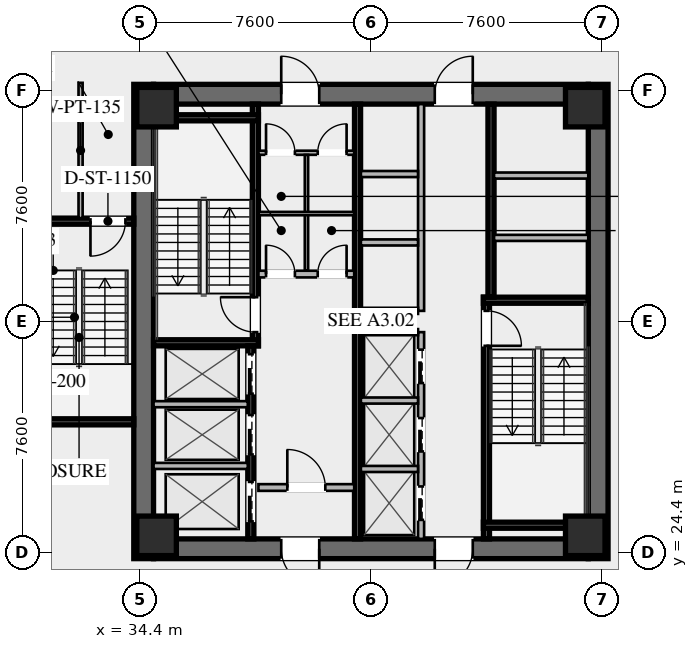
"""IFC4 building model, lengths in metres.
Left out: names, types, materials, properties, quantities, classifications, styles, units other than length and angle.
Written with IfcOpenShell. Run it as: python <this file> out.ifc"""

import sys

from ifc_helpers import new_model, si_unit, direction, frame, frame_2d, origin, origin_2d, place, context, subcontext, project, spatial, rectangle, hollow_rectangle, extrude, element, fill, save


model = new_model("IFC4")
c1 = context("Model", 3, precision=1e-05, world=origin(), true_north=direction((0.0, 1.0)))
c2 = subcontext(c1, "Body", "Model", "MODEL_VIEW")
j1 = project(units=[si_unit("LENGTHUNIT", "METRE"), si_unit("PLANEANGLEUNIT", "RADIAN")], contexts=[c1])
p1 = place(None, origin())
s1 = spatial("IfcSite", under=j1, at=p1, CompositionType="ELEMENT")
p2 = place(p1, origin())
s2 = spatial("IfcBuilding", under=s1, at=p2, CompositionType="ELEMENT")
p3 = place(p2, frame((0.0, 0.0, 15.6)))
s3 = spatial("IfcBuildingStorey", under=s2, at=p3, CompositionType="ELEMENT", Elevation=15.6)
for number, where, z_axis, x_axis in (
    (1, (34.525, 24.2, 0.0), (0.0, 0.0, 1.0), (0.0, 1.0, 0.0)),
    (2, (49.475, 39.8, 0.0), (0.0, 0.0, 1.0), (0.0, -1.0, 0.0)),
):
    element("IfcWall", number, at=place(p3, frame(where, z_axis=z_axis, x_axis=x_axis)), inside=s3, PredefinedType="SHEAR", context=c2, shape_type="SweptSolid", body=[
        extrude(rectangle(XDim=15.6, YDim=0.65, at=frame_2d((7.8, 0.0))), origin(), (0.0, 0.0, 1.0), 4.2),
    ])
p4 = place(p3, frame((49.15, 24.525, 0.0), z_axis=(0.0, 0.0, 1.0), x_axis=(-1.0, 0.0, 0.0)))
e3 = element("IfcWall", 3, at=p4, inside=s3, PredefinedType="SHEAR", context=c2, shape_type="SweptSolid", body=[
    extrude(rectangle(XDim=14.3, YDim=0.65, at=frame_2d((7.15, 0.0))), origin(), (0.0, 0.0, 1.0), 4.2),
])
p5 = place(p4, frame((8.85, 0.0, 0.0)))
e4 = element("IfcOpeningElement", 4, at=p5, cuts=e3, PredefinedType="OPENING", context=c2, shape_type="SweptSolid", body=[
    extrude(rectangle(XDim=1.25, YDim=2.25, at=frame_2d((0.625, 1.125))), frame((0.0, 0.335, 0.0), z_axis=(0.0, -1.0, 0.0), x_axis=(1.0, 0.0, 0.0)), (0.0, 0.0, 1.0), 0.67),
])
p6 = place(p4, frame((3.8, 0.0, 0.0)))
e5 = element("IfcOpeningElement", 5, at=p6, cuts=e3, PredefinedType="OPENING", context=c2, shape_type="SweptSolid", body=[
    extrude(rectangle(XDim=1.25, YDim=2.25, at=frame_2d((0.625, 1.125))), frame((0.0, 0.335, 0.0), z_axis=(0.0, -1.0, 0.0), x_axis=(1.0, 0.0, 0.0)), (0.0, 0.0, 1.0), 0.67),
])
p7 = place(p3, frame((34.85, 39.475, 0.0), z_axis=(0.0, 0.0, 1.0), x_axis=(1.0, 0.0, 0.0)))
e6 = element("IfcWall", 6, at=p7, inside=s3, PredefinedType="SHEAR", context=c2, shape_type="SweptSolid", body=[
    extrude(rectangle(XDim=14.3, YDim=0.65, at=frame_2d((7.15, 0.0))), origin(), (0.0, 0.0, 1.0), 4.2),
])
p8 = place(p7, frame((4.2, 0.0, 0.0)))
e7 = element("IfcOpeningElement", 7, at=p8, cuts=e6, PredefinedType="OPENING", context=c2, shape_type="SweptSolid", body=[
    extrude(rectangle(XDim=1.25, YDim=2.25, at=frame_2d((0.625, 1.125))), frame((0.0, 0.335, 0.0), z_axis=(0.0, -1.0, 0.0), x_axis=(1.0, 0.0, 0.0)), (0.0, 0.0, 1.0), 0.67),
])
p9 = place(p7, frame((9.25, 0.0, 0.0)))
e8 = element("IfcOpeningElement", 8, at=p9, cuts=e6, PredefinedType="OPENING", context=c2, shape_type="SweptSolid", body=[
    extrude(rectangle(XDim=1.25, YDim=2.25, at=frame_2d((0.625, 1.125))), frame((0.0, 0.335, 0.0), z_axis=(0.0, -1.0, 0.0), x_axis=(1.0, 0.0, 0.0)), (0.0, 0.0, 1.0), 0.67),
])
for number, where, z_axis, x_axis in (
    (9, (34.95, 24.95, 0.0), (0.0, 0.0, 1.0), (1.0, 0.0, 0.0)),
    (10, (49.05, 24.95, 0.0), (0.0, 0.0, 1.0), (1.0, 0.0, 0.0)),
    (11, (49.05, 39.05, 0.0), (0.0, 0.0, 1.0), (1.0, 0.0, 0.0)),
    (12, (34.95, 39.05, 0.0), (0.0, 0.0, 1.0), (1.0, 0.0, 0.0)),
):
    element("IfcColumn", number, at=place(p3, frame(where, z_axis=z_axis, x_axis=x_axis)), inside=s3, PredefinedType="COLUMN", context=c2, shape_type="SweptSolid", body=[
        extrude(hollow_rectangle(XDim=1.3, YDim=1.3, WallThickness=0.05, at=origin_2d()), origin(), (0.0, 0.0, 1.0), 3.9),
    ])
p10 = place(p3, frame((38.2, 31.2, 0.0), z_axis=(0.0, 0.0, 1.0), x_axis=(0.0, 1.0, 0.0)))
e13 = element("IfcWall", 13, at=p10, inside=s3, PredefinedType="SHEAR", context=c2, shape_type="SweptSolid", body=[
    extrude(rectangle(XDim=7.95, YDim=0.2, at=frame_2d((3.975, 0.0))), origin(), (0.0, 0.0, 1.0), 3.9),
])
p11 = place(p10, frame((0.45, 0.0, 0.0)))
e14 = element("IfcOpeningElement", 14, at=p11, cuts=e13, PredefinedType="OPENING", context=c2, shape_type="SweptSolid", body=[
    extrude(rectangle(XDim=1.15, YDim=2.2, at=frame_2d((0.575, 1.1))), frame((0.0, 0.11, 0.0), z_axis=(0.0, -1.0, 0.0), x_axis=(1.0, 0.0, 0.0)), (0.0, 0.0, 1.0), 0.22),
])
for number, where, z_axis, x_axis in (
    (15, (34.85, 31.3, 0.0), (0.0, 0.0, 1.0), (1.0, 0.0, 0.0)),
    (16, (34.85, 38.7, 0.0), (0.0, 0.0, 1.0), (1.0, 0.0, 0.0)),
):
    element("IfcWall", number, at=place(p3, frame(where, z_axis=z_axis, x_axis=x_axis)), inside=s3, PredefinedType="SHEAR", context=c2, shape_type="SweptSolid", body=[
        extrude(rectangle(XDim=3.45, YDim=0.2, at=frame_2d((1.725, 0.0))), origin(), (0.0, 0.0, 1.0), 3.9),
    ])
p12 = place(p3, frame((45.8, 32.8, 0.0), z_axis=(0.0, 0.0, 1.0), x_axis=(0.0, -1.0, 0.0)))
e17 = element("IfcWall", 17, at=p12, inside=s3, PredefinedType="SHEAR", context=c2, shape_type="SweptSolid", body=[
    extrude(rectangle(XDim=7.95, YDim=0.2, at=frame_2d((3.975, 0.0))), origin(), (0.0, 0.0, 1.0), 3.9),
])
p13 = place(p12, frame((0.45, 0.0, 0.0)))
e18 = element("IfcOpeningElement", 18, at=p13, cuts=e17, PredefinedType="OPENING", context=c2, shape_type="SweptSolid", body=[
    extrude(rectangle(XDim=1.15, YDim=2.2, at=frame_2d((0.575, 1.1))), frame((0.0, 0.11, 0.0), z_axis=(0.0, -1.0, 0.0), x_axis=(1.0, 0.0, 0.0)), (0.0, 0.0, 1.0), 0.22),
])
for number, where, z_axis, x_axis in (
    (19, (45.7, 32.7, 0.0), (0.0, 0.0, 1.0), (1.0, 0.0, 0.0)),
    (20, (45.7, 25.3, 0.0), (0.0, 0.0, 1.0), (1.0, 0.0, 0.0)),
):
    element("IfcWall", number, at=place(p3, frame(where, z_axis=z_axis, x_axis=x_axis)), inside=s3, PredefinedType="SHEAR", context=c2, shape_type="SweptSolid", body=[
        extrude(rectangle(XDim=3.45, YDim=0.2, at=frame_2d((1.725, 0.0))), origin(), (0.0, 0.0, 1.0), 3.9),
    ])
p14 = place(p3, frame((41.56, 24.85, 0.0), z_axis=(0.0, 0.0, 1.0), x_axis=(0.0, 1.0, 0.0)))
e21 = element("IfcWall", 21, at=p14, inside=s3, PredefinedType="SHEAR", context=c2, shape_type="SweptSolid", body=[
    extrude(rectangle(XDim=14.3, YDim=0.2, at=frame_2d((7.15, 0.0))), origin(), (0.0, 0.0, 1.0), 3.9),
])
p15 = place(p3, frame((38.3, 33.56, 0.0), z_axis=(0.0, 0.0, 1.0), x_axis=(1.0, 0.0, 0.0)))
e22 = element("IfcWall", 22, at=p15, inside=s3, PredefinedType="SOLIDWALL", context=c2, shape_type="SweptSolid", body=[
    extrude(rectangle(XDim=3.15, YDim=0.22, at=frame_2d((1.575, 0.0))), origin(), (0.0, 0.0, 1.0), 2.943),
])
p16 = place(p15, frame((0.25, 0.0, 0.0)))
e23 = element("IfcOpeningElement", 23, at=p16, cuts=e22, PredefinedType="OPENING", context=c2, shape_type="SweptSolid", body=[
    extrude(rectangle(XDim=0.95, YDim=2.05, at=frame_2d((0.475, 1.025))), frame((0.0, 0.12, 0.0), z_axis=(0.0, -1.0, 0.0), x_axis=(1.0, 0.0, 0.0)), (0.0, 0.0, 1.0), 0.24),
])
p17 = place(p15, frame((1.95, 0.0, 0.0)))
e24 = element("IfcOpeningElement", 24, at=p17, cuts=e22, PredefinedType="OPENING", context=c2, shape_type="SweptSolid", body=[
    extrude(rectangle(XDim=0.95, YDim=2.05, at=frame_2d((0.475, 1.025))), frame((0.0, 0.12, 0.0), z_axis=(0.0, -1.0, 0.0), x_axis=(1.0, 0.0, 0.0)), (0.0, 0.0, 1.0), 0.24),
])
p18 = place(p3, frame((38.3, 26.54, 0.0), z_axis=(0.0, 0.0, 1.0), x_axis=(1.0, 0.0, 0.0)))
e25 = element("IfcWall", 25, at=p18, inside=s3, PredefinedType="SOLIDWALL", context=c2, shape_type="SweptSolid", body=[
    extrude(rectangle(XDim=3.15, YDim=0.22, at=frame_2d((1.575, 0.0))), origin(), (0.0, 0.0, 1.0), 2.943),
])
p19 = place(p18, frame((0.95, 0.0, 0.0)))
e26 = element("IfcOpeningElement", 26, at=p19, cuts=e25, PredefinedType="OPENING", context=c2, shape_type="SweptSolid", body=[
    extrude(rectangle(XDim=1.25, YDim=2.25, at=frame_2d((0.625, 1.125))), frame((0.0, 0.12, 0.0), z_axis=(0.0, -1.0, 0.0), x_axis=(1.0, 0.0, 0.0)), (0.0, 0.0, 1.0), 0.24),
])
p20 = place(p3, frame((38.05, 24.85, 0.0), z_axis=(0.0, 0.0, 1.0), x_axis=(0.0, 1.0, 0.0)))
e27 = element("IfcWall", 27, at=p20, inside=s3, PredefinedType="SHEAR", context=c2, shape_type="SweptSolid", body=[
    extrude(rectangle(XDim=6.35, YDim=0.2, at=frame_2d((3.175, 0.0))), origin(), (0.0, 0.0, 1.0), 3.9),
])
p21 = place(p20, frame((4.775, 0.0, 0.0)))
e28 = element("IfcOpeningElement", 28, at=p21, cuts=e27, PredefinedType="OPENING", context=c2, shape_type="SweptSolid", body=[
    extrude(rectangle(XDim=1.3, YDim=2.25, at=frame_2d((0.65, 1.125))), frame((0.0, 0.11, 0.0), z_axis=(0.0, -1.0, 0.0), x_axis=(1.0, 0.0, 0.0)), (0.0, 0.0, 1.0), 0.22),
])
p22 = place(p20, frame((2.775, 0.0, 0.0)))
e29 = element("IfcOpeningElement", 29, at=p22, cuts=e27, PredefinedType="OPENING", context=c2, shape_type="SweptSolid", body=[
    extrude(rectangle(XDim=1.3, YDim=2.25, at=frame_2d((0.65, 1.125))), frame((0.0, 0.11, 0.0), z_axis=(0.0, -1.0, 0.0), x_axis=(1.0, 0.0, 0.0)), (0.0, 0.0, 1.0), 0.22),
])
p23 = place(p20, frame((0.575, 0.0, 0.0)))
e30 = element("IfcOpeningElement", 30, at=p23, cuts=e27, PredefinedType="OPENING", context=c2, shape_type="SweptSolid", body=[
    extrude(rectangle(XDim=1.3, YDim=2.25, at=frame_2d((0.65, 1.125))), frame((0.0, 0.11, 0.0), z_axis=(0.0, -1.0, 0.0), x_axis=(1.0, 0.0, 0.0)), (0.0, 0.0, 1.0), 0.22),
])
for number, where, z_axis, x_axis in (
    (31, (34.85, 27.25, 0.0), (0.0, 0.0, 1.0), (1.0, 0.0, 0.0)),
    (32, (34.85, 29.28, 0.0), (0.0, 0.0, 1.0), (1.0, 0.0, 0.0)),
):
    element("IfcWall", number, at=place(p3, frame(where, z_axis=z_axis, x_axis=x_axis)), inside=s3, PredefinedType="SOLIDWALL", context=c2, shape_type="SweptSolid", body=[
        extrude(rectangle(XDim=3.1, YDim=0.2, at=frame_2d((1.55, 0.0))), origin(), (0.0, 0.0, 1.0), 3.9),
    ])
p24 = place(p3, frame((45.95, 39.15, 0.0), z_axis=(0.0, 0.0, 1.0), x_axis=(0.0, -1.0, 0.0)))
e33 = element("IfcWall", 33, at=p24, inside=s3, PredefinedType="SHEAR", context=c2, shape_type="SweptSolid", body=[
    extrude(rectangle(XDim=6.35, YDim=0.2, at=frame_2d((3.175, 0.0))), origin(), (0.0, 0.0, 1.0), 3.9),
])
for number, where, z_axis, x_axis in (
    (34, (46.05, 34.75, 0.0), (0.0, 0.0, 1.0), (1.0, 0.0, 0.0)),
    (35, (46.05, 36.8, 0.0), (0.0, 0.0, 1.0), (1.0, 0.0, 0.0)),
):
    element("IfcWall", number, at=place(p3, frame(where, z_axis=z_axis, x_axis=x_axis)), inside=s3, PredefinedType="SOLIDWALL", context=c2, shape_type="SweptSolid", body=[
        extrude(rectangle(XDim=3.1, YDim=0.2, at=frame_2d((1.55, 0.0))), origin(), (0.0, 0.0, 1.0), 3.9),
    ])
p25 = place(p3, frame((38.3, 37.55, 0.0), z_axis=(0.0, 0.0, 1.0), x_axis=(1.0, 0.0, 0.0)))
e36 = element("IfcWall", 36, at=p25, inside=s3, PredefinedType="PARTITIONING", context=c2, shape_type="SweptSolid", body=[
    extrude(rectangle(XDim=3.15, YDim=0.135, at=frame_2d((1.575, 0.0))), origin(), (0.0, 0.0, 1.0), 2.943),
])
p26 = place(p25, frame((0.25, 0.0, 0.0)))
e37 = element("IfcOpeningElement", 37, at=p26, cuts=e36, PredefinedType="OPENING", context=c2, shape_type="SweptSolid", body=[
    extrude(rectangle(XDim=0.95, YDim=2.05, at=frame_2d((0.475, 1.025))), frame((0.0, 0.077, 0.0), z_axis=(0.0, -1.0, 0.0), x_axis=(1.0, 0.0, 0.0)), (0.0, 0.0, 1.0), 0.155),
])
p27 = place(p25, frame((1.95, 0.0, 0.0)))
e38 = element("IfcOpeningElement", 38, at=p27, cuts=e36, PredefinedType="OPENING", context=c2, shape_type="SweptSolid", body=[
    extrude(rectangle(XDim=0.95, YDim=2.05, at=frame_2d((0.475, 1.025))), frame((0.0, 0.077, 0.0), z_axis=(0.0, -1.0, 0.0), x_axis=(1.0, 0.0, 0.0)), (0.0, 0.0, 1.0), 0.155),
])
p28 = place(p3, frame((39.88, 33.68, 0.0), z_axis=(0.0, 0.0, 1.0), x_axis=(0.0, 1.0, 0.0)))
e39 = element("IfcWall", 39, at=p28, inside=s3, PredefinedType="PARTITIONING", context=c2, shape_type="SweptSolid", body=[
    extrude(rectangle(XDim=3.8, YDim=0.11, at=frame_2d((1.9, 0.0))), origin(), (0.0, 0.0, 1.0), 2.943),
])
p29 = place(p3, frame((38.3, 35.55, 0.0), z_axis=(0.0, 0.0, 1.0), x_axis=(1.0, 0.0, 0.0)))
e40 = element("IfcWall", 40, at=p29, inside=s3, PredefinedType="PARTITIONING", context=c2, shape_type="SweptSolid", body=[
    extrude(rectangle(XDim=3.15, YDim=0.11, at=frame_2d((1.575, 0.0))), origin(), (0.0, 0.0, 1.0), 2.943),
])
p30 = place(p3, frame((43.65, 24.85, 0.0), z_axis=(0.0, 0.0, 1.0), x_axis=(0.0, 1.0, 0.0)))
e41 = element("IfcWall", 41, at=p30, inside=s3, PredefinedType="SOLIDWALL", context=c2, shape_type="SweptSolid", body=[
    extrude(rectangle(XDim=6.8, YDim=0.2, at=frame_2d((3.4, 0.0))), origin(), (0.0, 0.0, 1.0), 3.9),
])
p31 = place(p30, frame((0.625, 0.0, 0.0)))
e42 = element("IfcOpeningElement", 42, at=p31, cuts=e41, PredefinedType="OPENING", context=c2, shape_type="SweptSolid", body=[
    extrude(rectangle(XDim=1.1, YDim=2.2, at=frame_2d((0.55, 1.1))), frame((0.0, 0.11, 0.0), z_axis=(0.0, -1.0, 0.0), x_axis=(1.0, 0.0, 0.0)), (0.0, 0.0, 1.0), 0.22),
])
p32 = place(p30, frame((2.875, 0.0, 0.0)))
e43 = element("IfcOpeningElement", 43, at=p32, cuts=e41, PredefinedType="OPENING", context=c2, shape_type="SweptSolid", body=[
    extrude(rectangle(XDim=1.1, YDim=2.2, at=frame_2d((0.55, 1.1))), frame((0.0, 0.11, 0.0), z_axis=(0.0, -1.0, 0.0), x_axis=(1.0, 0.0, 0.0)), (0.0, 0.0, 1.0), 0.22),
])
p33 = place(p30, frame((5.125, 0.0, 0.0)))
e44 = element("IfcOpeningElement", 44, at=p33, cuts=e41, PredefinedType="OPENING", context=c2, shape_type="SweptSolid", body=[
    extrude(rectangle(XDim=1.1, YDim=2.2, at=frame_2d((0.55, 1.1))), frame((0.0, 0.11, 0.0), z_axis=(0.0, -1.0, 0.0), x_axis=(1.0, 0.0, 0.0)), (0.0, 0.0, 1.0), 0.22),
])
for number, where, z_axis, x_axis in (
    (45, (41.67, 27.15, 0.0), (0.0, 0.0, 1.0), (1.0, 0.0, 0.0)),
    (46, (41.67, 29.4, 0.0), (0.0, 0.0, 1.0), (1.0, 0.0, 0.0)),
    (47, (41.67, 31.65, 0.0), (0.0, 0.0, 1.0), (1.0, 0.0, 0.0)),
):
    element("IfcWall", number, at=place(p3, frame(where, z_axis=z_axis, x_axis=x_axis)), inside=s3, PredefinedType="SOLIDWALL", context=c2, shape_type="SweptSolid", body=[
        extrude(rectangle(XDim=1.88, YDim=0.2, at=frame_2d((0.94, 0.0))), origin(), (0.0, 0.0, 1.0), 3.9),
    ])
p34 = place(p3, frame((43.65, 32.35, 0.0), z_axis=(0.0, 0.0, 1.0), x_axis=(0.0, 1.0, 0.0)))
e48 = element("IfcWall", 48, at=p34, inside=s3, PredefinedType="SOLIDWALL", context=c2, shape_type="SweptSolid", body=[
    extrude(rectangle(XDim=6.8, YDim=0.2, at=frame_2d((3.4, 0.0))), origin(), (0.0, 0.0, 1.0), 3.9),
])
for number, where, z_axis, x_axis in (
    (49, (41.67, 32.35, 0.0), (0.0, 0.0, 1.0), (1.0, 0.0, 0.0)),
    (50, (41.67, 34.6, 0.0), (0.0, 0.0, 1.0), (1.0, 0.0, 0.0)),
    (51, (41.67, 36.85, 0.0), (0.0, 0.0, 1.0), (1.0, 0.0, 0.0)),
):
    element("IfcWall", number, at=place(p3, frame(where, z_axis=z_axis, x_axis=x_axis)), inside=s3, PredefinedType="SOLIDWALL", context=c2, shape_type="SweptSolid", body=[
        extrude(rectangle(XDim=1.88, YDim=0.2, at=frame_2d((0.94, 0.0))), origin(), (0.0, 0.0, 1.0), 3.9),
    ])
p35 = place(p3, frame((34.2, 35.3, 0.0), z_axis=(0.0, 0.0, 1.0), x_axis=(-1.0, 0.0, 0.0)))
e52 = element("IfcWall", 52, at=p35, inside=s3, PredefinedType="SHEAR", context=c2, shape_type="SweptSolid", body=[
    extrude(rectangle(XDim=3.4, YDim=0.2, at=frame_2d((1.7, 0.0))), origin(), (0.0, 0.0, 1.0), 3.9),
])
p36 = place(p35, frame((0.275, 0.0, 0.0)))
e53 = element("IfcOpeningElement", 53, at=p36, cuts=e52, PredefinedType="OPENING", context=c2, shape_type="SweptSolid", body=[
    extrude(rectangle(XDim=1.15, YDim=2.2, at=frame_2d((0.575, 1.1))), frame((0.0, 0.11, 0.0), z_axis=(0.0, -1.0, 0.0), x_axis=(1.0, 0.0, 0.0)), (0.0, 0.0, 1.0), 0.22),
])
p37 = place(p3, frame((30.8, 28.7, 0.0), z_axis=(0.0, 0.0, 1.0), x_axis=(1.0, 0.0, 0.0)))
e54 = element("IfcWall", 54, at=p37, inside=s3, PredefinedType="SHEAR", context=c2, shape_type="SweptSolid", body=[
    extrude(rectangle(XDim=3.4, YDim=0.2, at=frame_2d((1.7, 0.0))), origin(), (0.0, 0.0, 1.0), 3.9),
])
p38 = place(p3, frame((32.45, 35.4, 0.0), z_axis=(0.0, 0.0, 1.0), x_axis=(0.0, 1.0, 0.0)))
e55 = element("IfcWall", 55, at=p38, inside=s3, PredefinedType="PARTITIONING", context=c2, shape_type="SweptSolid", body=[
    extrude(rectangle(XDim=4.45, YDim=0.135, at=frame_2d((2.225, 0.0))), origin(), (0.0, 0.0, 1.0), 2.943),
])
p39 = place(p8, origin())
e56 = element("IfcDoor", 56, at=p39, inside=s3, OperationType="SINGLE_SWING_LEFT", PredefinedType="DOOR", context=c2, shape_type="SweptSolid", body=[
    extrude(rectangle(XDim=1.25, YDim=2.25, at=frame_2d((0.625, 1.125))), frame((0.0, 0.025, 0.0), z_axis=(0.0, -1.0, 0.0), x_axis=(1.0, 0.0, 0.0)), (0.0, 0.0, 1.0), 0.05),
])
fill(e7, e56)
p40 = place(p9, origin())
e57 = element("IfcDoor", 57, at=p40, inside=s3, OperationType="SINGLE_SWING_RIGHT", PredefinedType="DOOR", context=c2, shape_type="SweptSolid", body=[
    extrude(rectangle(XDim=1.25, YDim=2.25, at=frame_2d((0.625, 1.125))), frame((0.0, 0.025, 0.0), z_axis=(0.0, -1.0, 0.0), x_axis=(1.0, 0.0, 0.0)), (0.0, 0.0, 1.0), 0.05),
])
fill(e8, e57)
p41 = place(p5, origin())
e58 = element("IfcDoor", 58, at=p41, inside=s3, OperationType="SINGLE_SWING_LEFT", PredefinedType="DOOR", context=c2, shape_type="SweptSolid", body=[
    extrude(rectangle(XDim=1.25, YDim=2.25, at=frame_2d((0.625, 1.125))), frame((0.0, 0.025, 0.0), z_axis=(0.0, -1.0, 0.0), x_axis=(1.0, 0.0, 0.0)), (0.0, 0.0, 1.0), 0.05),
])
fill(e4, e58)
p42 = place(p6, origin())
e59 = element("IfcDoor", 59, at=p42, inside=s3, OperationType="SINGLE_SWING_RIGHT", PredefinedType="DOOR", context=c2, shape_type="SweptSolid", body=[
    extrude(rectangle(XDim=1.25, YDim=2.25, at=frame_2d((0.625, 1.125))), frame((0.0, 0.025, 0.0), z_axis=(0.0, -1.0, 0.0), x_axis=(1.0, 0.0, 0.0)), (0.0, 0.0, 1.0), 0.05),
])
fill(e5, e59)
p43 = place(p11, origin())
e60 = element("IfcDoor", 60, at=p43, inside=s3, OperationType="SINGLE_SWING_RIGHT", PredefinedType="DOOR", context=c2, shape_type="SweptSolid", body=[
    extrude(rectangle(XDim=1.15, YDim=2.2, at=frame_2d((0.575, 1.1))), frame((0.0, 0.025, 0.0), z_axis=(0.0, -1.0, 0.0), x_axis=(1.0, 0.0, 0.0)), (0.0, 0.0, 1.0), 0.05),
])
fill(e14, e60)
p44 = place(p13, origin())
e61 = element("IfcDoor", 61, at=p44, inside=s3, OperationType="SINGLE_SWING_RIGHT", PredefinedType="DOOR", context=c2, shape_type="SweptSolid", body=[
    extrude(rectangle(XDim=1.15, YDim=2.2, at=frame_2d((0.575, 1.1))), frame((0.0, 0.025, 0.0), z_axis=(0.0, -1.0, 0.0), x_axis=(1.0, 0.0, 0.0)), (0.0, 0.0, 1.0), 0.05),
])
fill(e18, e61)
p45 = place(p19, origin())
e62 = element("IfcDoor", 62, at=p45, inside=s3, OperationType="SINGLE_SWING_LEFT", PredefinedType="DOOR", context=c2, shape_type="SweptSolid", body=[
    extrude(rectangle(XDim=1.25, YDim=2.25, at=frame_2d((0.625, 1.125))), frame((0.0, 0.025, 0.0), z_axis=(0.0, -1.0, 0.0), x_axis=(1.0, 0.0, 0.0)), (0.0, 0.0, 1.0), 0.05),
])
fill(e26, e62)
p46 = place(p26, origin())
e63 = element("IfcDoor", 63, at=p46, inside=s3, OperationType="SINGLE_SWING_LEFT", PredefinedType="DOOR", context=c2, shape_type="SweptSolid", body=[
    extrude(rectangle(XDim=0.95, YDim=2.05, at=frame_2d((0.475, 1.025))), frame((0.0, 0.025, 0.0), z_axis=(0.0, -1.0, 0.0), x_axis=(1.0, 0.0, 0.0)), (0.0, 0.0, 1.0), 0.05),
])
fill(e37, e63)
p47 = place(p27, origin())
e64 = element("IfcDoor", 64, at=p47, inside=s3, OperationType="SINGLE_SWING_RIGHT", PredefinedType="DOOR", context=c2, shape_type="SweptSolid", body=[
    extrude(rectangle(XDim=0.95, YDim=2.05, at=frame_2d((0.475, 1.025))), frame((0.0, 0.025, 0.0), z_axis=(0.0, -1.0, 0.0), x_axis=(1.0, 0.0, 0.0)), (0.0, 0.0, 1.0), 0.05),
])
fill(e38, e64)
p48 = place(p16, origin())
e65 = element("IfcDoor", 65, at=p48, inside=s3, OperationType="SINGLE_SWING_LEFT", PredefinedType="DOOR", context=c2, shape_type="SweptSolid", body=[
    extrude(rectangle(XDim=0.95, YDim=2.05, at=frame_2d((0.475, 1.025))), frame((0.0, 0.025, 0.0), z_axis=(0.0, -1.0, 0.0), x_axis=(1.0, 0.0, 0.0)), (0.0, 0.0, 1.0), 0.05),
])
fill(e23, e65)
p49 = place(p17, origin())
e66 = element("IfcDoor", 66, at=p49, inside=s3, OperationType="SINGLE_SWING_RIGHT", PredefinedType="DOOR", context=c2, shape_type="SweptSolid", body=[
    extrude(rectangle(XDim=0.95, YDim=2.05, at=frame_2d((0.475, 1.025))), frame((0.0, 0.025, 0.0), z_axis=(0.0, -1.0, 0.0), x_axis=(1.0, 0.0, 0.0)), (0.0, 0.0, 1.0), 0.05),
])
fill(e24, e66)
p50 = place(p36, origin())
e67 = element("IfcDoor", 67, at=p50, inside=s3, OperationType="SINGLE_SWING_RIGHT", PredefinedType="DOOR", context=c2, shape_type="SweptSolid", body=[
    extrude(rectangle(XDim=1.15, YDim=2.2, at=frame_2d((0.575, 1.1))), frame((0.0, 0.025, 0.0), z_axis=(0.0, -1.0, 0.0), x_axis=(1.0, 0.0, 0.0)), (0.0, 0.0, 1.0), 0.05),
])
fill(e53, e67)
p51 = place(p21, origin())
e68 = element("IfcDoor", 68, at=p51, inside=s3, OperationType="SLIDING_TO_LEFT", PredefinedType="DOOR", context=c2, shape_type="SweptSolid", body=[
    extrude(rectangle(XDim=1.3, YDim=2.25, at=frame_2d((0.65, 1.125))), frame((0.0, 0.025, 0.0), z_axis=(0.0, -1.0, 0.0), x_axis=(1.0, 0.0, 0.0)), (0.0, 0.0, 1.0), 0.05),
])
fill(e28, e68)
p52 = place(p22, origin())
e69 = element("IfcDoor", 69, at=p52, inside=s3, OperationType="SLIDING_TO_LEFT", PredefinedType="DOOR", context=c2, shape_type="SweptSolid", body=[
    extrude(rectangle(XDim=1.3, YDim=2.25, at=frame_2d((0.65, 1.125))), frame((0.0, 0.025, 0.0), z_axis=(0.0, -1.0, 0.0), x_axis=(1.0, 0.0, 0.0)), (0.0, 0.0, 1.0), 0.05),
])
fill(e29, e69)
p53 = place(p23, origin())
e70 = element("IfcDoor", 70, at=p53, inside=s3, OperationType="SLIDING_TO_LEFT", PredefinedType="DOOR", context=c2, shape_type="SweptSolid", body=[
    extrude(rectangle(XDim=1.3, YDim=2.25, at=frame_2d((0.65, 1.125))), frame((0.0, 0.025, 0.0), z_axis=(0.0, -1.0, 0.0), x_axis=(1.0, 0.0, 0.0)), (0.0, 0.0, 1.0), 0.05),
])
fill(e30, e70)
p54 = place(p31, origin())
e71 = element("IfcDoor", 71, at=p54, inside=s3, OperationType="SLIDING_TO_LEFT", PredefinedType="DOOR", context=c2, shape_type="SweptSolid", body=[
    extrude(rectangle(XDim=1.1, YDim=2.2, at=frame_2d((0.55, 1.1))), frame((0.0, 0.025, 0.0), z_axis=(0.0, -1.0, 0.0), x_axis=(1.0, 0.0, 0.0)), (0.0, 0.0, 1.0), 0.05),
])
fill(e42, e71)
p55 = place(p32, origin())
e72 = element("IfcDoor", 72, at=p55, inside=s3, OperationType="SLIDING_TO_LEFT", PredefinedType="DOOR", context=c2, shape_type="SweptSolid", body=[
    extrude(rectangle(XDim=1.1, YDim=2.2, at=frame_2d((0.55, 1.1))), frame((0.0, 0.025, 0.0), z_axis=(0.0, -1.0, 0.0), x_axis=(1.0, 0.0, 0.0)), (0.0, 0.0, 1.0), 0.05),
])
fill(e43, e72)
p56 = place(p33, origin())
e73 = element("IfcDoor", 73, at=p56, inside=s3, OperationType="SLIDING_TO_LEFT", PredefinedType="DOOR", context=c2, shape_type="SweptSolid", body=[
    extrude(rectangle(XDim=1.1, YDim=2.2, at=frame_2d((0.55, 1.1))), frame((0.0, 0.025, 0.0), z_axis=(0.0, -1.0, 0.0), x_axis=(1.0, 0.0, 0.0)), (0.0, 0.0, 1.0), 0.05),
])
fill(e44, e73)
save(model, sys.argv[1])
